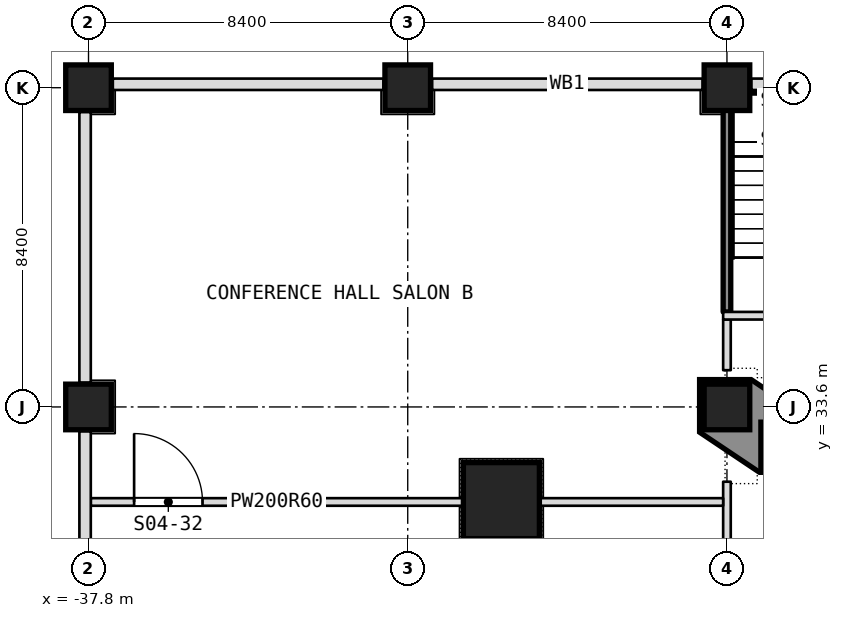
"""IFC4 building model, lengths in metres.
Left out: names, types, materials, properties, quantities, classifications, styles, units other than length and angle.
Written with IfcOpenShell. Run it as: python <this file> out.ifc"""

import sys

from ifc_helpers import new_model, si_unit, direction, frame, frame_2d, origin, origin_2d, place, context, subcontext, project, spatial, polyline, rectangle, outline, extrude, element, fill, save


model = new_model("IFC4")
c1 = context("Model", 3, precision=1e-05, world=origin(), true_north=direction((0.0, 1.0)))
c2 = subcontext(c1, "Body", "Model", "MODEL_VIEW")
j1 = project(units=[si_unit("LENGTHUNIT", "METRE"), si_unit("PLANEANGLEUNIT", "RADIAN")], contexts=[c1])
p1 = place(None, origin())
s1 = spatial("IfcSite", under=j1, at=p1, CompositionType="ELEMENT")
p2 = place(p1, origin())
s2 = spatial("IfcBuilding", under=s1, at=p2, CompositionType="ELEMENT")
p3 = place(p2, frame((0.0, 0.0, 21.0)))
s3 = spatial("IfcBuildingStorey", under=s2, at=p3, CompositionType="ELEMENT", Elevation=21.0)
for number, where, z_axis, x_axis in (
    (1, (-37.8, 33.6, 0.0), (0.0, 0.0, 1.0), (1.0, 0.0, 0.0)),
    (2, (-21.0, 33.6, 0.0), (0.0, 0.0, 1.0), (1.0, 0.0, 0.0)),
    (3, (-37.8, 42.0, 0.0), (0.0, 0.0, 1.0), (1.0, 0.0, 0.0)),
    (4, (-29.4, 42.0, 0.0), (0.0, 0.0, 1.0), (1.0, 0.0, 0.0)),
    (5, (-21.0, 42.0, 0.0), (0.0, 0.0, 1.0), (1.0, 0.0, 0.0)),
):
    element("IfcColumn", number, at=place(p3, frame(where, z_axis=z_axis, x_axis=x_axis)), inside=s3, PredefinedType="COLUMN", context=c2, shape_type="SweptSolid", body=[
        extrude(rectangle(XDim=1.2, YDim=1.2, at=origin_2d()), origin(), (0.0, 0.0, 1.0), 5.0),
    ])
p4 = place(p3, frame((-26.936, 31.135, 0.0), z_axis=(0.0, 0.0, 1.0), x_axis=(1.0, 0.0, 0.0)))
e6 = element("IfcColumn", 6, at=p4, inside=s3, PredefinedType="COLUMN", context=c2, shape_type="SweptSolid", body=[
    extrude(rectangle(XDim=2.0, YDim=2.0, at=origin_2d()), origin(), (0.0, 0.0, 1.0), 5.0),
])
p5 = place(p3, frame((-19.507, 32.6, 0.0), z_axis=(0.0, 0.0, 1.0), x_axis=(1.0, 0.0, 0.0)))
e7 = element("IfcColumn", 7, at=p5, inside=s3, PredefinedType="COLUMN", context=c2, shape_type="SweptSolid", body=[
    extrude(rectangle(XDim=1.2, YDim=1.2, at=origin_2d()), origin(), (0.0, 0.0, 1.0), 5.0),
])
p6 = place(p3, frame((-21.0, 9.5, 0.0), z_axis=(0.0, 0.0, 1.0), x_axis=(0.0, 1.0, 0.0)))
e8 = element("IfcWall", 8, at=p6, inside=s3, PredefinedType="PARTITIONING", context=c2, shape_type="SweptSolid", body=[
    extrude(rectangle(XDim=22.133, YDim=0.2, at=frame_2d((11.066, 0.0))), origin(), (0.0, 0.0, 1.0), 4.68),
])
p7 = place(p6, frame((8.3, 0.0, 0.0)))
e9 = element("IfcOpeningElement", 9, at=p7, cuts=e8, PredefinedType="OPENING", context=c2, shape_type="SweptSolid", body=[
    extrude(rectangle(XDim=1.0, YDim=2.1, at=frame_2d((0.5, 1.05))), frame((0.0, 0.1, 0.0), z_axis=(0.0, -1.0, 0.0), x_axis=(1.0, 0.0, 0.0)), (0.0, 0.0, 1.0), 0.2),
])
p8 = place(p6, frame((16.7, 0.0, 0.0)))
e10 = element("IfcOpeningElement", 10, at=p8, cuts=e8, PredefinedType="OPENING", context=c2, shape_type="SweptSolid", body=[
    extrude(rectangle(XDim=1.8, YDim=2.1, at=frame_2d((0.9, 1.05))), frame((0.0, 0.1, 0.0), z_axis=(0.0, -1.0, 0.0), x_axis=(1.0, 0.0, 0.0)), (0.0, 0.0, 1.0), 0.2),
])
p9 = place(p3, frame((-21.0, 34.567, 0.0), z_axis=(0.0, 0.0, 1.0), x_axis=(0.0, 1.0, 0.0)))
e11 = element("IfcWall", 11, at=p9, inside=s3, PredefinedType="PARTITIONING", context=c2, shape_type="SweptSolid", body=[
    extrude(rectangle(XDim=1.333, YDim=0.2, at=frame_2d((0.667, 0.0))), origin(), (0.0, 0.0, 1.0), 4.68),
])
p10 = place(p3, frame((-21.0, 36.1, 0.0), z_axis=(0.0, 0.0, 1.0), x_axis=(0.0, 1.0, 0.0)))
e12 = element("IfcWall", 12, at=p10, inside=s3, PredefinedType="PARTITIONING", context=c2, shape_type="SweptSolid", body=[
    extrude(rectangle(XDim=6.2, YDim=0.2, at=frame_2d((3.1, 0.0))), origin(), (0.0, 0.0, 1.0), 4.68),
])
p11 = place(p3, frame((-37.74, 31.1, 0.0), z_axis=(0.0, 0.0, 1.0), x_axis=(1.0, 0.0, 0.0)))
e13 = element("IfcWall", 13, at=p11, inside=s3, PredefinedType="PARTITIONING", context=c2, shape_type="SweptSolid", body=[
    extrude(rectangle(XDim=9.784, YDim=0.2, at=frame_2d((4.892, 0.0))), origin(), (0.0, 0.0, 1.0), 4.68),
])
p12 = place(p11, frame((1.14, 0.0, 0.0)))
e14 = element("IfcOpeningElement", 14, at=p12, cuts=e13, PredefinedType="OPENING", context=c2, shape_type="SweptSolid", body=[
    extrude(rectangle(XDim=1.8, YDim=2.1, at=frame_2d((0.9, 1.05))), frame((0.0, 0.1, 0.0), z_axis=(0.0, -1.0, 0.0), x_axis=(1.0, 0.0, 0.0)), (0.0, 0.0, 1.0), 0.2),
])
p13 = place(p3, frame((-25.916, 31.1, 0.0), z_axis=(0.0, 0.0, 1.0), x_axis=(1.0, 0.0, 0.0)))
e15 = element("IfcWall", 15, at=p13, inside=s3, PredefinedType="PARTITIONING", context=c2, shape_type="SweptSolid", body=[
    extrude(rectangle(XDim=4.816, YDim=0.2, at=frame_2d((2.408, 0.0))), origin(), (0.0, 0.0, 1.0), 4.68),
])
p14 = place(p3, frame((-21.1, 36.0, 0.0), z_axis=(0.0, 0.0, 1.0), x_axis=(1.0, 0.0, 0.0)))
e16 = element("IfcWall", 16, at=p14, inside=s3, PredefinedType="PARTITIONING", context=c2, shape_type="SweptSolid", body=[
    extrude(rectangle(XDim=23.3, YDim=0.2, at=frame_2d((11.65, 0.0))), origin(), (0.0, 0.0, 1.0), 4.68),
])
p15 = place(p14, frame((1.6, 0.0, 0.0)))
e17 = element("IfcOpeningElement", 17, at=p15, cuts=e16, PredefinedType="OPENING", context=c2, shape_type="SweptSolid", body=[
    extrude(rectangle(XDim=1.2, YDim=2.1, at=frame_2d((0.6, 1.05))), frame((0.0, 0.1, 0.0), z_axis=(0.0, -1.0, 0.0), x_axis=(1.0, 0.0, 0.0)), (0.0, 0.0, 1.0), 0.2),
])
p16 = place(p14, frame((6.0, 0.0, 0.0)))
e18 = element("IfcOpeningElement", 18, at=p16, cuts=e16, PredefinedType="OPENING", context=c2, shape_type="SweptSolid", body=[
    extrude(rectangle(XDim=1.0, YDim=2.1, at=frame_2d((0.5, 1.05))), frame((0.0, 0.1, 0.0), z_axis=(0.0, -1.0, 0.0), x_axis=(1.0, 0.0, 0.0)), (0.0, 0.0, 1.0), 0.2),
])
p17 = place(p14, frame((13.15, 0.0, 0.0)))
e19 = element("IfcOpeningElement", 19, at=p17, cuts=e16, PredefinedType="OPENING", context=c2, shape_type="SweptSolid", body=[
    extrude(rectangle(XDim=1.0, YDim=2.1, at=frame_2d((0.5, 1.05))), frame((0.0, 0.1, 0.0), z_axis=(0.0, -1.0, 0.0), x_axis=(1.0, 0.0, 0.0)), (0.0, 0.0, 1.0), 0.2),
])
p18 = place(p14, frame((20.5, 0.0, 0.0)))
e20 = element("IfcOpeningElement", 20, at=p18, cuts=e16, PredefinedType="OPENING", context=c2, shape_type="SweptSolid", body=[
    extrude(rectangle(XDim=1.2, YDim=2.1, at=frame_2d((0.6, 1.05))), frame((0.0, 0.1, 0.0), z_axis=(0.0, -1.0, 0.0), x_axis=(1.0, 0.0, 0.0)), (0.0, 0.0, 1.0), 0.2),
])
for number, where, z_axis, x_axis in (
    (21, (-13.24, 42.09, 0.0), (0.0, 0.0, 1.0), (-1.0, 0.0, 0.0)),
    (22, (-21.64, 42.09, 0.0), (0.0, 0.0, 1.0), (-1.0, 0.0, 0.0)),
):
    element("IfcWall", number, at=place(p3, frame(where, z_axis=z_axis, x_axis=x_axis)), inside=s3, PredefinedType="NOTDEFINED", context=c2, shape_type="SweptSolid", body=[
        extrude(rectangle(XDim=7.12, YDim=0.3, at=frame_2d((3.56, 0.0))), origin(), (0.0, 0.0, 1.0), 3.78),
    ])
p19 = place(p3, frame((-30.04, 42.09, 0.0), z_axis=(0.0, 0.0, 1.0), x_axis=(-1.0, 0.0, 0.0)))
e23 = element("IfcWall", 23, at=p19, inside=s3, PredefinedType="NOTDEFINED", context=c2, shape_type="SweptSolid", body=[
    extrude(rectangle(XDim=7.12, YDim=0.3, at=frame_2d((3.56, 0.0))), origin(), (0.0, 0.0, 1.0), 3.78),
])
p20 = place(p3, frame((-37.89, 41.36, 0.0), z_axis=(0.0, 0.0, 1.0), x_axis=(0.0, -1.0, 0.0)))
e24 = element("IfcWall", 24, at=p20, inside=s3, PredefinedType="NOTDEFINED", context=c2, shape_type="SweptSolid", body=[
    extrude(rectangle(XDim=7.12, YDim=0.3, at=frame_2d((3.56, 0.0))), origin(), (0.0, 0.0, 1.0), 3.78),
])
p21 = place(p3, frame((-37.89, 32.96, 0.0), z_axis=(0.0, 0.0, 1.0), x_axis=(0.0, -1.0, 0.0)))
e25 = element("IfcWall", 25, at=p21, inside=s3, PredefinedType="NOTDEFINED", context=c2, shape_type="SweptSolid", body=[
    extrude(rectangle(XDim=7.12, YDim=0.3, at=frame_2d((3.56, 0.0))), origin(), (0.0, 0.0, 1.0), 3.78),
])
p22 = place(p3, origin())
e26 = element("IfcWall", 26, at=p22, inside=s3, PredefinedType="SOLIDWALL", context=c2, shape_type="SweptSolid", body=[
    extrude(outline(polyline([(-21.72, 34.32), (-20.364, 34.32), (-18.787, 33.264), (-18.787, 31.88), (-20.143, 31.88), (-21.72, 32.936), (-21.72, 34.32)]), holes=[polyline([(-18.907, 32.0), (-18.907, 33.2), (-20.107, 33.2), (-20.107, 32.0), (-18.907, 32.0)]), polyline([(-20.4, 33.0), (-20.4, 34.2), (-21.6, 34.2), (-21.6, 33.0), (-20.4, 33.0)])]), origin(), (0.0, 0.0, 1.0), 5.0),
])
p23 = place(p12, origin())
e27 = element("IfcDoor", 27, at=p23, inside=s3, OperationType="DOUBLE_DOOR_SINGLE_SWING", PredefinedType="DOOR", context=c2, shape_type="SweptSolid", body=[
    extrude(rectangle(XDim=1.8, YDim=2.1, at=frame_2d((0.9, 1.05))), frame((0.0, 0.025, 0.0), z_axis=(0.0, -1.0, 0.0), x_axis=(1.0, 0.0, 0.0)), (0.0, 0.0, 1.0), 0.05),
])
fill(e14, e27)
save(model, sys.argv[1])
